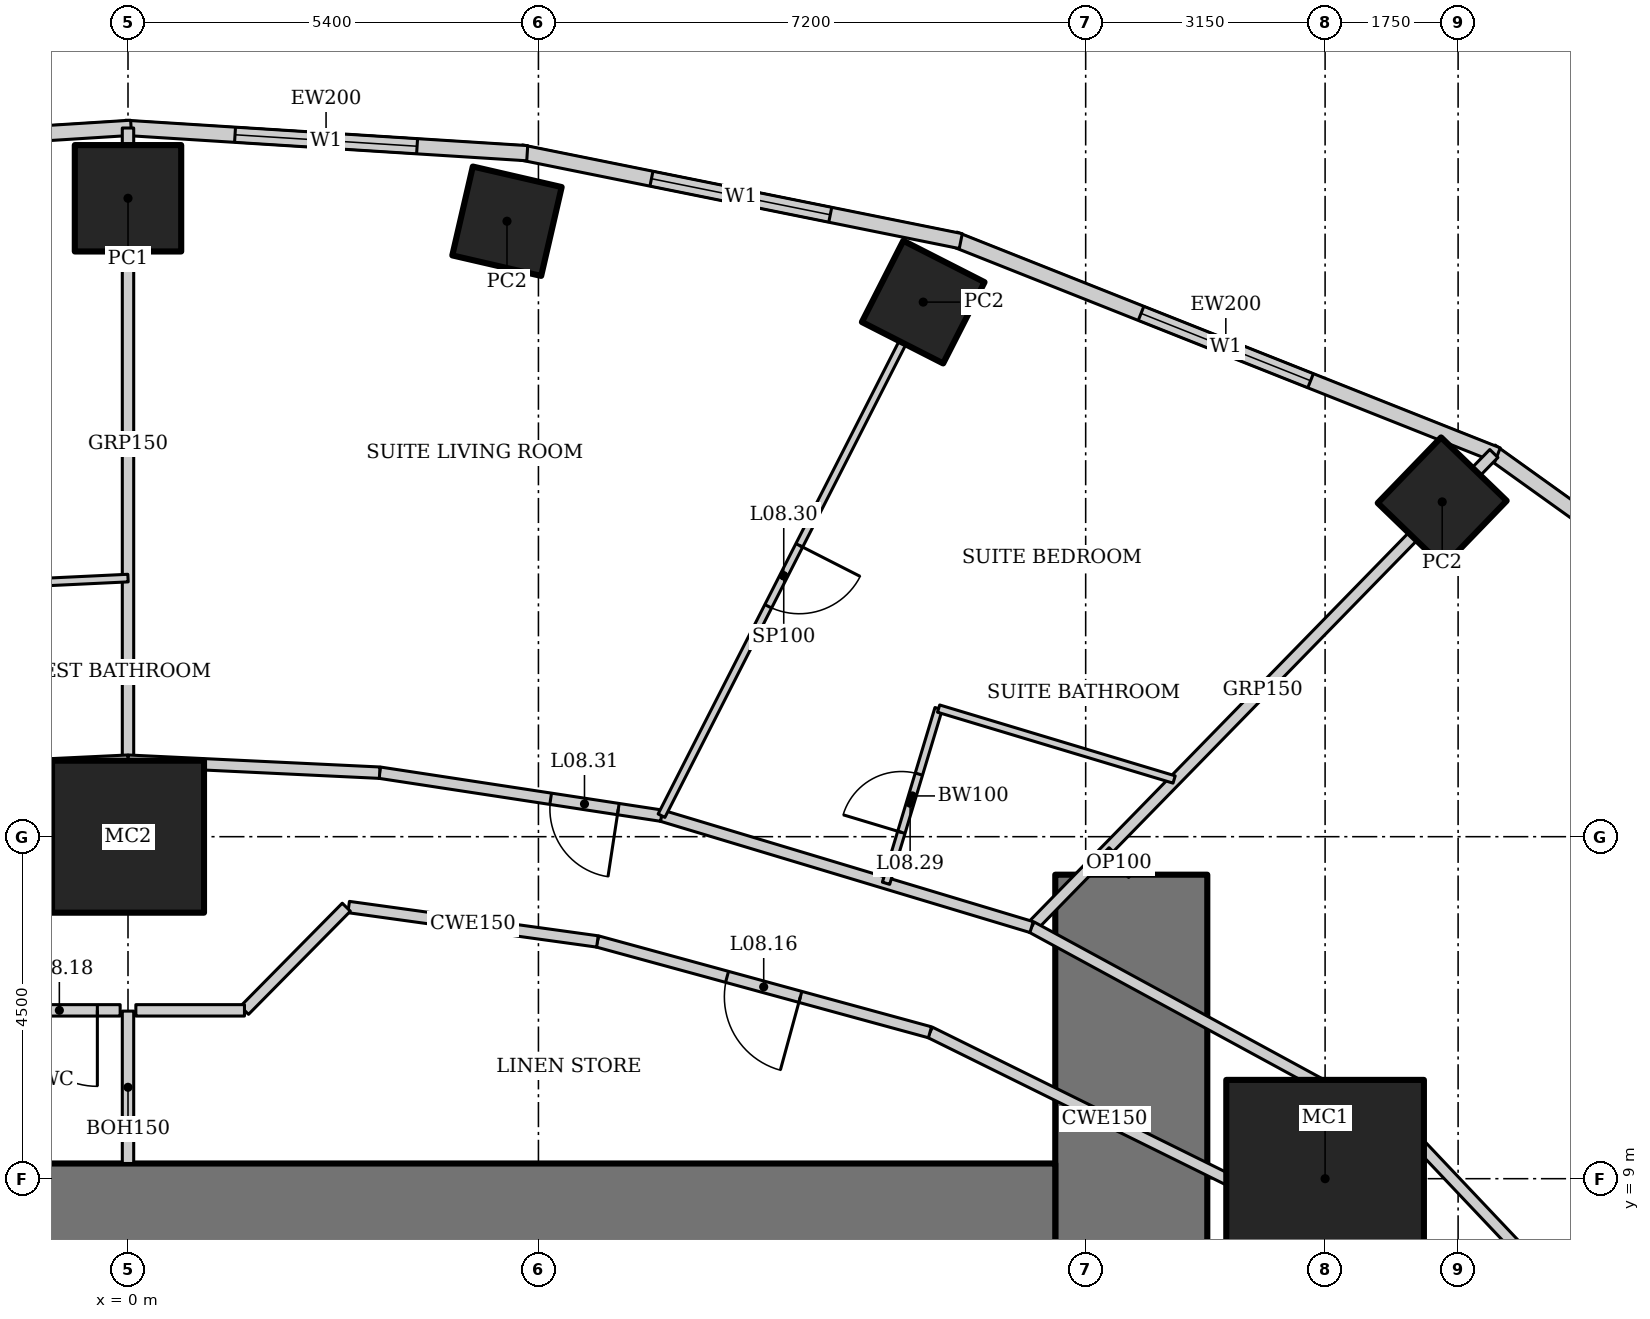
"""IFC4 building model, lengths in metres.
Left out: names, types, materials, properties, quantities, classifications, styles, units other than length and angle.
Written with IfcOpenShell. Run it as: python <this file> out.ifc"""

import sys

from ifc_helpers import new_model, si_unit, direction, frame, frame_2d, origin, origin_2d, place, context, subcontext, project, spatial, rectangle, hollow_rectangle, extrude, element, fill, save


model = new_model("IFC4")
c1 = context("Model", 3, precision=1e-05, world=origin(), true_north=direction((0.0, 1.0)))
c2 = subcontext(c1, "Body", "Model", "MODEL_VIEW")
j1 = project(units=[si_unit("LENGTHUNIT", "METRE"), si_unit("PLANEANGLEUNIT", "RADIAN")], contexts=[c1])
p1 = place(None, origin())
s1 = spatial("IfcSite", under=j1, at=p1, CompositionType="ELEMENT")
p2 = place(p1, origin())
s2 = spatial("IfcBuilding", under=s1, at=p2, CompositionType="ELEMENT")
p3 = place(p2, frame((0.0, 0.0, 44.2)))
s3 = spatial("IfcBuildingStorey", under=s2, at=p3, CompositionType="ELEMENT", Elevation=44.2)
p4 = place(p3, frame((15.75, 9.0, 0.0), z_axis=(0.0, 0.0, 1.0), x_axis=(1.0, 0.0, 0.0)))
e1 = element("IfcColumn", 1, at=p4, inside=s3, PredefinedType="COLUMN", context=c2, shape_type="SweptSolid", body=[
    extrude(hollow_rectangle(XDim=2.6, YDim=2.6, WallThickness=0.13, at=origin_2d()), origin(), (0.0, 0.0, 1.0), 3.6),
])
p5 = place(p3, frame((0.0, 13.5, 0.0), z_axis=(0.0, 0.0, 1.0), x_axis=(1.0, 0.0, 0.0)))
e2 = element("IfcColumn", 2, at=p5, inside=s3, PredefinedType="COLUMN", context=c2, shape_type="SweptSolid", body=[
    extrude(hollow_rectangle(XDim=2.0, YDim=2.0, WallThickness=0.17, at=origin_2d()), origin(), (0.0, 0.0, 1.0), 3.6),
])
for number, where, z_axis, x_axis in (
    (3, (17.291, 17.905, 0.0), (0.0, 0.0, 1.0), (0.695, 0.719, 0.0)),
    (4, (10.463, 20.534, 0.0), (0.0, 0.0, 1.0), (0.454, 0.891, 0.0)),
    (5, (4.986, 21.598, 0.0), (0.0, 0.0, 1.0), (0.225, 0.974, 0.0)),
):
    element("IfcColumn", number, at=place(p3, frame(where, z_axis=z_axis, x_axis=x_axis)), inside=s3, PredefinedType="COLUMN", context=c2, shape_type="SweptSolid", body=[
        extrude(hollow_rectangle(XDim=1.2, YDim=1.2, WallThickness=0.1, at=origin_2d()), origin(), (0.0, 0.0, 1.0), 3.6),
    ])
p6 = place(p3, frame((0.0, 21.9, 0.0), z_axis=(0.0, 0.0, 1.0), x_axis=(1.0, 0.0, 0.0)))
e6 = element("IfcColumn", 6, at=p6, inside=s3, PredefinedType="COLUMN", context=c2, shape_type="SweptSolid", body=[
    extrude(hollow_rectangle(XDim=1.4, YDim=1.4, WallThickness=0.1, at=origin_2d()), origin(), (0.0, 0.0, 1.0), 3.6),
])
p7 = place(p3, frame((13.2, -13.0, 0.0), z_axis=(0.0, 0.0, 1.0), x_axis=(0.0, 1.0, 0.0)))
e7 = element("IfcWall", 7, at=p7, inside=s3, PredefinedType="SHEAR", context=c2, shape_type="SweptSolid", body=[
    extrude(rectangle(XDim=26.0, YDim=2.0, at=frame_2d((13.0, 0.0))), origin(), (0.0, 0.0, 1.0), 3.6),
])
p8 = place(p7, frame((12.1, 0.0, 0.0)))
e8 = element("IfcOpeningElement", 8, at=p8, cuts=e7, PredefinedType="OPENING", context=c2, shape_type="SweptSolid", body=[
    extrude(rectangle(XDim=1.8, YDim=2.1, at=frame_2d((0.9, 1.05))), frame((0.0, 1.01, 0.0), z_axis=(0.0, -1.0, 0.0), x_axis=(1.0, 0.0, 0.0)), (0.0, 0.0, 1.0), 2.02),
])
p9 = place(p3, frame((12.2, 8.0, 0.0), z_axis=(0.0, 0.0, 1.0), x_axis=(-1.0, 0.0, 0.0)))
e9 = element("IfcWall", 9, at=p9, inside=s3, PredefinedType="SHEAR", context=c2, shape_type="SweptSolid", body=[
    extrude(rectangle(XDim=24.4, YDim=2.4, at=frame_2d((12.2, 0.0))), origin(), (0.0, 0.0, 1.0), 3.6),
])
p10 = place(p3, frame((24.482, 13.875, 0.0), z_axis=(0.0, 0.0, 1.0), x_axis=(-0.812791321576, 0.582554948112, 0.0)))
e10 = element("IfcWall", 10, at=p10, inside=s3, PredefinedType="SOLIDWALL", context=c2, shape_type="SweptSolid", body=[
    extrude(rectangle(XDim=8.063, YDim=0.2, at=frame_2d((4.032, 0.0))), origin(), (0.0, 0.0, 1.0), 3.45),
])
p11 = place(p10, frame((2.832, 0.0, 0.5)))
e11 = element("IfcOpeningElement", 11, at=p11, cuts=e10, PredefinedType="OPENING", context=c2, shape_type="SweptSolid", body=[
    extrude(rectangle(XDim=2.4, YDim=2.2, at=frame_2d((1.2, 1.1))), frame((0.0, 0.11, 0.0), z_axis=(0.0, -1.0, 0.0), x_axis=(1.0, 0.0, 0.0)), (0.0, 0.0, 1.0), 0.22),
])
p12 = place(p3, frame((18.018, 18.523, 0.0), z_axis=(0.0, 0.0, 1.0), x_axis=(-0.929358351251, 0.369178892895, 0.0)))
e12 = element("IfcWall", 12, at=p12, inside=s3, PredefinedType="SOLIDWALL", context=c2, shape_type="SweptSolid", body=[
    extrude(rectangle(XDim=7.692, YDim=0.2, at=frame_2d((3.846, 0.0))), origin(), (0.0, 0.0, 1.0), 3.45),
])
p13 = place(p12, frame((2.646, 0.0, 0.5)))
e13 = element("IfcOpeningElement", 13, at=p13, cuts=e12, PredefinedType="OPENING", context=c2, shape_type="SweptSolid", body=[
    extrude(rectangle(XDim=2.4, YDim=2.2, at=frame_2d((1.2, 1.1))), frame((0.0, 0.11, 0.0), z_axis=(0.0, -1.0, 0.0), x_axis=(1.0, 0.0, 0.0)), (0.0, 0.0, 1.0), 0.22),
])
p14 = place(p3, frame((10.957, 21.337, 0.0), z_axis=(0.0, 0.0, 1.0), x_axis=(-0.980251657452, 0.197754110105, 0.0)))
e14 = element("IfcWall", 14, at=p14, inside=s3, PredefinedType="SOLIDWALL", context=c2, shape_type="SweptSolid", body=[
    extrude(rectangle(XDim=5.904, YDim=0.2, at=frame_2d((2.952, 0.0))), origin(), (0.0, 0.0, 1.0), 3.45),
])
p15 = place(p14, frame((1.752, 0.0, 0.5)))
e15 = element("IfcOpeningElement", 15, at=p15, cuts=e14, PredefinedType="OPENING", context=c2, shape_type="SweptSolid", body=[
    extrude(rectangle(XDim=2.4, YDim=2.2, at=frame_2d((1.2, 1.1))), frame((0.0, 0.11, 0.0), z_axis=(0.0, -1.0, 0.0), x_axis=(1.0, 0.0, 0.0)), (0.0, 0.0, 1.0), 0.22),
])
p16 = place(p3, frame((5.253, 22.493, 0.0), z_axis=(0.0, 0.0, 1.0), x_axis=(-0.998018582375, 0.062919863585, 0.0)))
e16 = element("IfcWall", 16, at=p16, inside=s3, PredefinedType="SOLIDWALL", context=c2, shape_type="SweptSolid", body=[
    extrude(rectangle(XDim=5.304, YDim=0.2, at=frame_2d((2.652, 0.0))), origin(), (0.0, 0.0, 1.0), 3.45),
])
p17 = place(p16, frame((1.452, 0.0, 0.5)))
e17 = element("IfcOpeningElement", 17, at=p17, cuts=e16, PredefinedType="OPENING", context=c2, shape_type="SweptSolid", body=[
    extrude(rectangle(XDim=2.4, YDim=2.2, at=frame_2d((1.2, 1.1))), frame((0.0, 0.11, 0.0), z_axis=(0.0, -1.0, 0.0), x_axis=(1.0, 0.0, 0.0)), (0.0, 0.0, 1.0), 0.22),
])
p18 = place(p3, frame((0.041, 22.827, 0.0), z_axis=(0.0, 0.0, 1.0), x_axis=(-0.998018582375, -0.062919863585, 0.0)))
e18 = element("IfcWall", 18, at=p18, inside=s3, PredefinedType="SOLIDWALL", context=c2, shape_type="SweptSolid", body=[
    extrude(rectangle(XDim=5.304, YDim=0.2, at=frame_2d((2.652, 0.0))), origin(), (0.0, 0.0, 1.0), 3.45),
])
p19 = place(p18, frame((1.452, 0.0, 0.5)))
e19 = element("IfcOpeningElement", 19, at=p19, cuts=e18, PredefinedType="OPENING", context=c2, shape_type="SweptSolid", body=[
    extrude(rectangle(XDim=2.4, YDim=2.2, at=frame_2d((1.2, 1.1))), frame((0.0, 0.11, 0.0), z_axis=(0.0, -1.0, 0.0), x_axis=(1.0, 0.0, 0.0)), (0.0, 0.0, 1.0), 0.22),
])
p20 = place(p3, frame((17.97, 18.542, 0.0), z_axis=(0.0, 0.0, 1.0), x_axis=(-0.698503223934, -0.715606907564, 0.0)))
e20 = element("IfcWall", 20, at=p20, inside=s3, PredefinedType="PARTITIONING", context=c2, shape_type="SweptSolid", body=[
    extrude(rectangle(XDim=8.707, YDim=0.15, at=frame_2d((4.354, 0.0))), origin(), (0.0, 0.0, 1.0), 2.528),
])
p21 = place(p3, frame((0.0, 22.825, 0.0), z_axis=(0.0, 0.0, 1.0), x_axis=(0.0, -1.0, 0.0)))
e21 = element("IfcWall", 21, at=p21, inside=s3, PredefinedType="PARTITIONING", context=c2, shape_type="SweptSolid", body=[
    extrude(rectangle(XDim=8.325, YDim=0.15, at=frame_2d((4.162, 0.0))), origin(), (0.0, 0.0, 1.0), 2.924),
])
p22 = place(p3, frame((20.984, 5.232, 0.0), z_axis=(0.0, 0.0, 1.0), x_axis=(-0.687062608696, 0.726598218916, 0.0)))
e22 = element("IfcWall", 22, at=p22, inside=s3, PredefinedType="PARTITIONING", context=c2, shape_type="SweptSolid", body=[
    extrude(rectangle(XDim=6.039, YDim=0.15, at=frame_2d((3.02, 0.0))), origin(), (0.0, 0.0, 1.0), 3.45),
])
p23 = place(p22, frame((0.15, 0.0, 0.0)))
e23 = element("IfcOpeningElement", 23, at=p23, cuts=e22, PredefinedType="OPENING", context=c2, shape_type="SweptSolid", body=[
    extrude(rectangle(XDim=0.9, YDim=2.1, at=frame_2d((0.45, 1.05))), frame((0.0, 0.085, 0.0), z_axis=(0.0, -1.0, 0.0), x_axis=(1.0, 0.0, 0.0)), (0.0, 0.0, 1.0), 0.17),
])
p24 = place(p3, frame((16.835, 9.62, 0.0), z_axis=(0.0, 0.0, 1.0), x_axis=(-0.878450059298, 0.477834169267, 0.0)))
e24 = element("IfcWall", 24, at=p24, inside=s3, PredefinedType="PARTITIONING", context=c2, shape_type="SweptSolid", body=[
    extrude(rectangle(XDim=5.631, YDim=0.15, at=frame_2d((2.815, 0.0))), origin(), (0.0, 0.0, 1.0), 3.45),
])
p25 = place(p3, frame((11.888, 12.311, 0.0), z_axis=(0.0, 0.0, 1.0), x_axis=(-0.957564241242, 0.288219922793, 0.0)))
e25 = element("IfcWall", 25, at=p25, inside=s3, PredefinedType="PARTITIONING", context=c2, shape_type="SweptSolid", body=[
    extrude(rectangle(XDim=5.085, YDim=0.15, at=frame_2d((2.542, 0.0))), origin(), (0.0, 0.0, 1.0), 3.45),
])
p26 = place(p3, frame((7.019, 13.776, 0.0), z_axis=(0.0, 0.0, 1.0), x_axis=(-0.988564270062, 0.150800145746, 0.0)))
e26 = element("IfcWall", 26, at=p26, inside=s3, PredefinedType="PARTITIONING", context=c2, shape_type="SweptSolid", body=[
    extrude(rectangle(XDim=3.751, YDim=0.15, at=frame_2d((1.875, 0.0))), origin(), (0.0, 0.0, 1.0), 3.45),
])
p27 = place(p26, frame((0.575, 0.0, 0.0)))
e27 = element("IfcOpeningElement", 27, at=p27, cuts=e26, PredefinedType="OPENING", context=c2, shape_type="SweptSolid", body=[
    extrude(rectangle(XDim=0.9, YDim=2.1, at=frame_2d((0.45, 1.05))), frame((0.0, 0.085, 0.0), z_axis=(0.0, -1.0, 0.0), x_axis=(1.0, 0.0, 0.0)), (0.0, 0.0, 1.0), 0.17),
])
p28 = place(p3, frame((3.311, 14.342, 0.0), z_axis=(0.0, 0.0, 1.0), x_axis=(-0.998863968075, 0.047652631422, 0.0)))
e28 = element("IfcWall", 28, at=p28, inside=s3, PredefinedType="PARTITIONING", context=c2, shape_type="SweptSolid", body=[
    extrude(rectangle(XDim=3.315, YDim=0.15, at=frame_2d((1.657, 0.0))), origin(), (0.0, 0.0, 1.0), 3.45),
])
p29 = place(p3, frame((0.0, 14.5, 0.0), z_axis=(0.0, 0.0, 1.0), x_axis=(-0.998863968075, -0.047652631422, 0.0)))
e29 = element("IfcWall", 29, at=p29, inside=s3, PredefinedType="PARTITIONING", context=c2, shape_type="SweptSolid", body=[
    extrude(rectangle(XDim=3.315, YDim=0.15, at=frame_2d((1.657, 0.0))), origin(), (0.0, 0.0, 1.0), 3.45),
])
p30 = place(p29, frame((2.265, 0.0, 0.0)))
e30 = element("IfcOpeningElement", 30, at=p30, cuts=e29, PredefinedType="OPENING", context=c2, shape_type="SweptSolid", body=[
    extrude(rectangle(XDim=0.9, YDim=2.1, at=frame_2d((0.45, 1.05))), frame((0.0, 0.085, 0.0), z_axis=(0.0, -1.0, 0.0), x_axis=(1.0, 0.0, 0.0)), (0.0, 0.0, 1.0), 0.17),
])
p31 = place(p3, frame((19.177, 4.781, 0.0), z_axis=(0.0, 0.0, 1.0), x_axis=(-0.720837261072, 0.693104352209, 0.0)))
e31 = element("IfcWall", 31, at=p31, inside=s3, PredefinedType="PARTITIONING", context=c2, shape_type="SweptSolid", body=[
    extrude(rectangle(XDim=5.59, YDim=0.15, at=frame_2d((2.795, 0.0))), origin(), (0.0, 0.0, 1.0), 3.45),
])
p32 = place(p31, frame((2.295, 0.0, 0.0)))
e32 = element("IfcOpeningElement", 32, at=p32, cuts=e31, PredefinedType="OPENING", context=c2, shape_type="SweptSolid", body=[
    extrude(rectangle(XDim=1.0, YDim=2.1, at=frame_2d((0.5, 1.05))), frame((0.0, 0.085, 0.0), z_axis=(0.0, -1.0, 0.0), x_axis=(1.0, 0.0, 0.0)), (0.0, 0.0, 1.0), 0.17),
])
p33 = place(p3, frame((15.147, 8.656, 0.0), z_axis=(0.0, 0.0, 1.0), x_axis=(-0.89656943448, 0.442903205177, 0.0)))
e33 = element("IfcWall", 33, at=p33, inside=s3, PredefinedType="PARTITIONING", context=c2, shape_type="SweptSolid", body=[
    extrude(rectangle(XDim=5.126, YDim=0.15, at=frame_2d((2.563, 0.0))), origin(), (0.0, 0.0, 1.0), 3.45),
])
p34 = place(p3, frame((10.551, 10.926, 0.0), z_axis=(0.0, 0.0, 1.0), x_axis=(-0.964644466646, 0.263554648923, 0.0)))
e34 = element("IfcWall", 34, at=p34, inside=s3, PredefinedType="PARTITIONING", context=c2, shape_type="SweptSolid", body=[
    extrude(rectangle(XDim=4.535, YDim=0.15, at=frame_2d((2.268, 0.0))), origin(), (0.0, 0.0, 1.0), 3.45),
])
p35 = place(p34, frame((1.768, 0.0, 0.0)))
e35 = element("IfcOpeningElement", 35, at=p35, cuts=e34, PredefinedType="OPENING", context=c2, shape_type="SweptSolid", body=[
    extrude(rectangle(XDim=1.0, YDim=2.1, at=frame_2d((0.5, 1.05))), frame((0.0, 0.085, 0.0), z_axis=(0.0, -1.0, 0.0), x_axis=(1.0, 0.0, 0.0)), (0.0, 0.0, 1.0), 0.17),
])
p36 = place(p3, frame((6.176, 12.122, 0.0), z_axis=(0.0, 0.0, 1.0), x_axis=(-0.990563451353, 0.137054911782, 0.0)))
e36 = element("IfcWall", 36, at=p36, inside=s3, PredefinedType="PARTITIONING", context=c2, shape_type="SweptSolid", body=[
    extrude(rectangle(XDim=3.304, YDim=0.15, at=frame_2d((1.652, 0.0))), origin(), (0.0, 0.0, 1.0), 3.45),
])
p37 = place(p3, frame((9.973, 12.887, 0.0), z_axis=(0.0, 0.0, 1.0), x_axis=(0.288290341405, 0.957543042924, 0.0)))
e37 = element("IfcWall", 37, at=p37, inside=s3, PredefinedType="PARTITIONING", context=c2, shape_type="SweptSolid", body=[
    extrude(rectangle(XDim=2.4, YDim=0.1, at=frame_2d((1.2, 0.0))), origin(), (0.0, 0.0, 1.0), 3.45),
])
p38 = place(p37, frame((0.7, 0.0, 0.0)))
e38 = element("IfcOpeningElement", 38, at=p38, cuts=e37, PredefinedType="OPENING", context=c2, shape_type="SweptSolid", body=[
    extrude(rectangle(XDim=0.8, YDim=2.1, at=frame_2d((0.4, 1.05))), frame((0.0, 0.06, 0.0), z_axis=(0.0, -1.0, 0.0), x_axis=(1.0, 0.0, 0.0)), (0.0, 0.0, 1.0), 0.12),
])
p39 = place(p3, frame((10.665, 15.185, 0.0), z_axis=(0.0, 0.0, 1.0), x_axis=(0.957568413147, -0.288206061946, 0.0)))
e39 = element("IfcWall", 39, at=p39, inside=s3, PredefinedType="PARTITIONING", context=c2, shape_type="SweptSolid", body=[
    extrude(rectangle(XDim=3.236, YDim=0.1, at=frame_2d((1.618, 0.0))), origin(), (0.0, 0.0, 1.0), 3.45),
])
p40 = place(p3, frame((10.236, 20.088, 0.0), z_axis=(0.0, 0.0, 1.0), x_axis=(-0.454010445571, -0.890996360998, 0.0)))
e40 = element("IfcWall", 40, at=p40, inside=s3, PredefinedType="PARTITIONING", context=c2, shape_type="SweptSolid", body=[
    extrude(rectangle(XDim=7.084, YDim=0.1, at=frame_2d((3.542, 0.0))), origin(), (0.0, 0.0, 1.0), 2.528),
])
p41 = place(p40, frame((3.092, 0.0, 0.0)))
e41 = element("IfcOpeningElement", 41, at=p41, cuts=e40, PredefinedType="OPENING", context=c2, shape_type="SweptSolid", body=[
    extrude(rectangle(XDim=0.9, YDim=2.1, at=frame_2d((0.45, 1.05))), frame((0.0, 0.06, 0.0), z_axis=(0.0, -1.0, 0.0), x_axis=(1.0, 0.0, 0.0)), (0.0, 0.0, 1.0), 0.12),
])
p42 = place(p3, frame((-2.112, 16.802, 0.0), z_axis=(0.0, 0.0, 1.0), x_axis=(0.998862383453, 0.047685835668, 0.0)))
e42 = element("IfcWall", 42, at=p42, inside=s3, PredefinedType="PARTITIONING", context=c2, shape_type="SweptSolid", body=[
    extrude(rectangle(XDim=2.115, YDim=0.1, at=frame_2d((1.057, 0.0))), origin(), (0.0, 0.0, 1.0), 3.45),
])
p43 = place(p3, frame((13.2, 13.0, 0.0), z_axis=(0.0, 0.0, 1.0), x_axis=(-0.715599628005, 0.698510681664, 0.0)))
e43 = element("IfcWall", 43, at=p43, inside=s3, PredefinedType="PARTITIONING", context=c2, shape_type="SweptSolid", body=[
    extrude(rectangle(XDim=0.457, YDim=0.1, at=frame_2d((0.229, 0.0))), origin(), (0.0, 0.0, 1.0), 3.45),
])
p44 = place(p3, frame((0.0, 9.2, 0.0), z_axis=(0.0, 0.0, 1.0), x_axis=(0.0, 1.0, 0.0)))
e44 = element("IfcWall", 44, at=p44, inside=s3, PredefinedType="PARTITIONING", context=c2, shape_type="SweptSolid", body=[
    extrude(rectangle(XDim=2.005, YDim=0.15, at=frame_2d((1.002, 0.0))), origin(), (0.0, 0.0, 1.0), 3.044),
])
p45 = place(p3, frame((2.873, 12.572, 0.0), z_axis=(0.0, 0.0, 1.0), x_axis=(-0.702677261973, -0.711508724828, 0.0)))
e45 = element("IfcWall", 45, at=p45, inside=s3, PredefinedType="PARTITIONING", context=c2, shape_type="SweptSolid", body=[
    extrude(rectangle(XDim=1.907, YDim=0.15, at=frame_2d((0.954, 0.0))), origin(), (0.0, 0.0, 1.0), 3.45),
])
p46 = place(p3, frame((1.532, 11.215, 0.0), z_axis=(0.0, 0.0, 1.0), x_axis=(-1.0, 0.0, 0.0)))
e46 = element("IfcWall", 46, at=p46, inside=s3, PredefinedType="PARTITIONING", context=c2, shape_type="SweptSolid", body=[
    extrude(rectangle(XDim=1.429, YDim=0.15, at=frame_2d((0.714, 0.0))), origin(), (0.0, 0.0, 1.0), 3.45),
])
p47 = place(p3, frame((-0.103, 11.215, 0.0), z_axis=(0.0, 0.0, 1.0), x_axis=(-1.0, 0.0, 0.0)))
e47 = element("IfcWall", 47, at=p47, inside=s3, PredefinedType="PARTITIONING", context=c2, shape_type="SweptSolid", body=[
    extrude(rectangle(XDim=1.429, YDim=0.15, at=frame_2d((0.714, 0.0))), origin(), (0.0, 0.0, 1.0), 3.45),
])
p48 = place(p47, frame((0.3, 0.0, 0.0)))
e48 = element("IfcOpeningElement", 48, at=p48, cuts=e47, PredefinedType="OPENING", context=c2, shape_type="SweptSolid", body=[
    extrude(rectangle(XDim=1.0, YDim=2.1, at=frame_2d((0.5, 1.05))), frame((0.0, 0.085, 0.0), z_axis=(0.0, -1.0, 0.0), x_axis=(1.0, 0.0, 0.0)), (0.0, 0.0, 1.0), 0.17),
])
p49 = place(p13, origin())
e49 = element("IfcWindow", 49, at=p49, inside=s3, PartitioningType="SINGLE_PANEL", PredefinedType="WINDOW", context=c2, shape_type="SweptSolid", body=[
    extrude(rectangle(XDim=2.4, YDim=2.2, at=frame_2d((1.2, 1.1))), frame((0.0, 0.03, 0.0), z_axis=(0.0, -1.0, 0.0), x_axis=(1.0, 0.0, 0.0)), (0.0, 0.0, 1.0), 0.06),
])
fill(e13, e49)
p50 = place(p15, origin())
e50 = element("IfcWindow", 50, at=p50, inside=s3, PartitioningType="SINGLE_PANEL", PredefinedType="WINDOW", context=c2, shape_type="SweptSolid", body=[
    extrude(rectangle(XDim=2.4, YDim=2.2, at=frame_2d((1.2, 1.1))), frame((0.0, 0.03, 0.0), z_axis=(0.0, -1.0, 0.0), x_axis=(1.0, 0.0, 0.0)), (0.0, 0.0, 1.0), 0.06),
])
fill(e15, e50)
p51 = place(p17, origin())
e51 = element("IfcWindow", 51, at=p51, inside=s3, PartitioningType="SINGLE_PANEL", PredefinedType="WINDOW", context=c2, shape_type="SweptSolid", body=[
    extrude(rectangle(XDim=2.4, YDim=2.2, at=frame_2d((1.2, 1.1))), frame((0.0, 0.03, 0.0), z_axis=(0.0, -1.0, 0.0), x_axis=(1.0, 0.0, 0.0)), (0.0, 0.0, 1.0), 0.06),
])
fill(e17, e51)
p52 = place(p35, origin())
e52 = element("IfcDoor", 52, at=p52, inside=s3, OperationType="SINGLE_SWING_LEFT", PredefinedType="DOOR", context=c2, shape_type="SweptSolid", body=[
    extrude(rectangle(XDim=1.0, YDim=2.1, at=frame_2d((0.5, 1.05))), frame((0.0, 0.025, 0.0), z_axis=(0.0, -1.0, 0.0), x_axis=(1.0, 0.0, 0.0)), (0.0, 0.0, 1.0), 0.05),
])
fill(e35, e52)
p53 = place(p48, origin())
e53 = element("IfcDoor", 53, at=p53, inside=s3, OperationType="SINGLE_SWING_LEFT", PredefinedType="DOOR", context=c2, shape_type="SweptSolid", body=[
    extrude(rectangle(XDim=1.0, YDim=2.1, at=frame_2d((0.5, 1.05))), frame((0.0, 0.025, 0.0), z_axis=(0.0, -1.0, 0.0), x_axis=(1.0, 0.0, 0.0)), (0.0, 0.0, 1.0), 0.05),
])
fill(e48, e53)
p54 = place(p38, origin())
e54 = element("IfcDoor", 54, at=p54, inside=s3, OperationType="SINGLE_SWING_LEFT", PredefinedType="DOOR", context=c2, shape_type="SweptSolid", body=[
    extrude(rectangle(XDim=0.8, YDim=2.1, at=frame_2d((0.4, 1.05))), frame((0.0, 0.025, 0.0), z_axis=(0.0, -1.0, 0.0), x_axis=(1.0, 0.0, 0.0)), (0.0, 0.0, 1.0), 0.05),
])
fill(e38, e54)
p55 = place(p41, origin())
e55 = element("IfcDoor", 55, at=p55, inside=s3, OperationType="SINGLE_SWING_LEFT", PredefinedType="DOOR", context=c2, shape_type="SweptSolid", body=[
    extrude(rectangle(XDim=0.9, YDim=2.1, at=frame_2d((0.45, 1.05))), frame((0.0, 0.025, 0.0), z_axis=(0.0, -1.0, 0.0), x_axis=(1.0, 0.0, 0.0)), (0.0, 0.0, 1.0), 0.05),
])
fill(e41, e55)
p56 = place(p27, origin())
e56 = element("IfcDoor", 56, at=p56, inside=s3, OperationType="SINGLE_SWING_LEFT", PredefinedType="DOOR", context=c2, shape_type="SweptSolid", body=[
    extrude(rectangle(XDim=0.9, YDim=2.1, at=frame_2d((0.45, 1.05))), frame((0.0, 0.025, 0.0), z_axis=(0.0, -1.0, 0.0), x_axis=(1.0, 0.0, 0.0)), (0.0, 0.0, 1.0), 0.05),
])
fill(e27, e56)
save(model, sys.argv[1])
